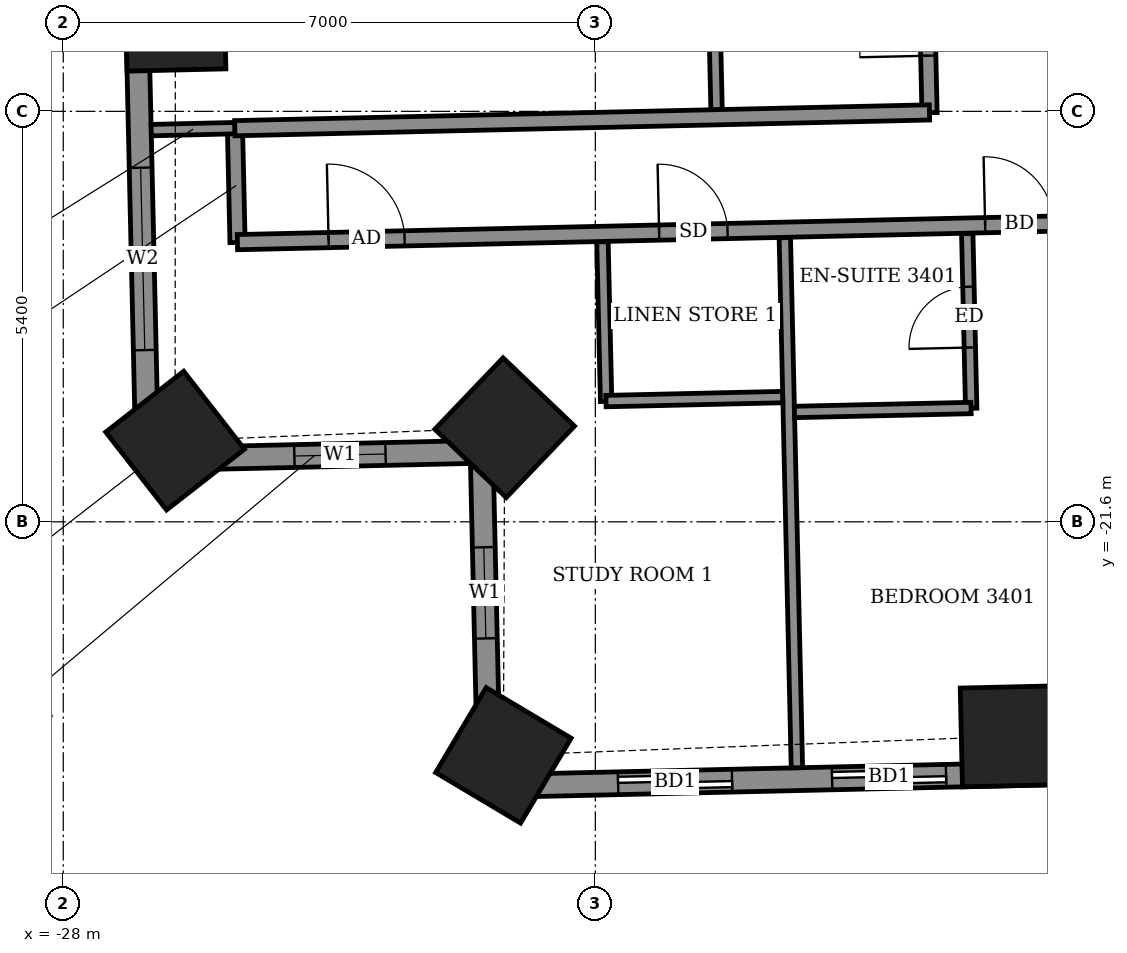
"""IFC4 building model, lengths in metres.
Left out: names, types, materials, properties, quantities, classifications, styles, units other than length and angle.
Written with IfcOpenShell. Run it as: python <this file> out.ifc"""

import sys

from ifc_helpers import new_model, si_unit, direction, frame, frame_2d, origin, origin_2d, place, context, subcontext, project, spatial, rectangle, extrude, element, fill, save


model = new_model("IFC4")
c1 = context("Model", 3, precision=1e-05, world=origin(), true_north=direction((0.0, 1.0)))
c2 = subcontext(c1, "Body", "Model", "MODEL_VIEW")
j1 = project(units=[si_unit("LENGTHUNIT", "METRE"), si_unit("PLANEANGLEUNIT", "RADIAN")], contexts=[c1])
p1 = place(None, origin())
s1 = spatial("IfcSite", under=j1, at=p1, CompositionType="ELEMENT")
p2 = place(p1, origin())
s2 = spatial("IfcBuilding", under=s1, at=p2, CompositionType="ELEMENT")
p3 = place(p2, frame((0.0, 0.0, 137.3)))
s3 = spatial("IfcBuildingStorey", under=s2, at=p3, CompositionType="ELEMENT", Elevation=137.3)
for number, where, z_axis, x_axis in (
    (1, (-26.525, -15.006, -0.55), (0.0, 0.0, 1.0), (0.023, -1.0, 0.0)),
    (2, (-26.529, -20.532, -0.55), (0.0, 0.0, 1.0), (0.615, -0.788, 0.0)),
    (3, (-22.193, -20.362, -0.55), (0.0, 0.0, 1.0), (0.723, -0.691, 0.0)),
    (4, (-22.209, -24.672, -0.55), (0.0, 0.0, 1.0), (0.859, -0.512, 0.0)),
    (5, (-15.535, -24.422, -0.55), (0.0, 0.0, 1.0), (1.0, 0.023, 0.0)),
):
    element("IfcColumn", number, at=place(p3, frame(where, z_axis=z_axis, x_axis=x_axis)), inside=s3, PredefinedType="COLUMN", context=c2, shape_type="SweptSolid", body=[
        extrude(rectangle(XDim=1.3, YDim=1.3, at=origin_2d()), origin(), (0.0, 0.0, 1.0), 3.6),
    ])
p4 = place(p3, frame((-27.161, -9.052, 0.0), z_axis=(0.0, 0.0, 1.0), x_axis=(0.022665616813, -0.999743101909, 0.0)))
e6 = element("IfcWall", 6, at=p4, inside=s3, PredefinedType="SOLIDWALL", context=c2, shape_type="SweptSolid", body=[
    extrude(rectangle(XDim=11.73, YDim=0.3, at=frame_2d((5.865, 0.0))), origin(), (0.0, 0.0, 1.0), 3.05),
])
p5 = place(p4, frame((1.029, 0.0, 0.0)))
e7 = element("IfcOpeningElement", 7, at=p5, cuts=e6, PredefinedType="OPENING", context=c2, shape_type="SweptSolid", body=[
    extrude(rectangle(XDim=1.5, YDim=2.4, at=frame_2d((0.75, 1.2))), frame((0.0, 0.16, 0.0), z_axis=(0.0, -1.0, 0.0), x_axis=(1.0, 0.0, 0.0)), (0.0, 0.0, 1.0), 0.32),
])
p6 = place(p4, frame((3.71, 0.0, 0.9)))
e8 = element("IfcOpeningElement", 8, at=p6, cuts=e6, PredefinedType="OPENING", context=c2, shape_type="SweptSolid", body=[
    extrude(rectangle(XDim=1.2, YDim=1.5, at=frame_2d((0.6, 0.75))), frame((0.0, 0.16, 0.0), z_axis=(0.0, -1.0, 0.0), x_axis=(1.0, 0.0, 0.0)), (0.0, 0.0, 1.0), 0.32),
])
p7 = place(p4, frame((7.892, 0.0, 0.9)))
e9 = element("IfcOpeningElement", 9, at=p7, cuts=e6, PredefinedType="OPENING", context=c2, shape_type="SweptSolid", body=[
    extrude(rectangle(XDim=2.4, YDim=1.5, at=frame_2d((1.2, 0.75))), frame((0.0, 0.16, 0.0), z_axis=(0.0, -1.0, 0.0), x_axis=(1.0, 0.0, 0.0)), (0.0, 0.0, 1.0), 0.32),
])
p8 = place(p3, frame((-26.895, -20.779, 0.0), z_axis=(0.0, 0.0, 1.0), x_axis=(0.999741204967, 0.022749133868, 0.0)))
e10 = element("IfcWall", 10, at=p8, inside=s3, PredefinedType="SOLIDWALL", context=c2, shape_type="SweptSolid", body=[
    extrude(rectangle(XDim=4.4, YDim=0.3, at=frame_2d((2.2, 0.0))), origin(), (0.0, 0.0, 1.0), 2.55),
])
p9 = place(p8, frame((1.936, 0.0, 0.9)))
e11 = element("IfcOpeningElement", 11, at=p9, cuts=e10, PredefinedType="OPENING", context=c2, shape_type="SweptSolid", body=[
    extrude(rectangle(XDim=1.2, YDim=1.5, at=frame_2d((0.6, 0.75))), frame((0.0, 0.16, 0.0), z_axis=(0.0, -1.0, 0.0), x_axis=(1.0, 0.0, 0.0)), (0.0, 0.0, 1.0), 0.32),
])
p10 = place(p3, frame((-22.496, -20.679, 0.0), z_axis=(0.0, 0.0, 1.0), x_axis=(0.022749133868, -0.999741204967, 0.0)))
e12 = element("IfcWall", 12, at=p10, inside=s3, PredefinedType="SOLIDWALL", context=c2, shape_type="SweptSolid", body=[
    extrude(rectangle(XDim=4.4, YDim=0.3, at=frame_2d((2.2, 0.0))), origin(), (0.0, 0.0, 1.0), 2.55),
])
p11 = place(p10, frame((1.256, 0.0, 0.9)))
e13 = element("IfcOpeningElement", 13, at=p11, cuts=e12, PredefinedType="OPENING", context=c2, shape_type="SweptSolid", body=[
    extrude(rectangle(XDim=1.2, YDim=1.5, at=frame_2d((0.6, 0.75))), frame((0.0, 0.16, 0.0), z_axis=(0.0, -1.0, 0.0), x_axis=(1.0, 0.0, 0.0)), (0.0, 0.0, 1.0), 0.32),
])
p12 = place(p3, frame((-22.396, -25.078, 0.0), z_axis=(0.0, 0.0, 1.0), x_axis=(0.99974279854, 0.022678993965, 0.0)))
e14 = element("IfcWall", 14, at=p12, inside=s3, PredefinedType="SOLIDWALL", context=c2, shape_type="SweptSolid", body=[
    extrude(rectangle(XDim=41.844, YDim=0.3, at=frame_2d((20.922, 0.0))), origin(), (0.0, 0.0, 1.0), 3.05),
])
p13 = place(p12, frame((1.696, 0.0, 0.0)))
e15 = element("IfcOpeningElement", 15, at=p13, cuts=e14, PredefinedType="OPENING", context=c2, shape_type="SweptSolid", body=[
    extrude(rectangle(XDim=1.5, YDim=2.4, at=frame_2d((0.75, 1.2))), frame((0.0, 0.16, 0.0), z_axis=(0.0, -1.0, 0.0), x_axis=(1.0, 0.0, 0.0)), (0.0, 0.0, 1.0), 0.32),
])
p14 = place(p12, frame((4.512, 0.0, 0.0)))
e16 = element("IfcOpeningElement", 16, at=p14, cuts=e14, PredefinedType="OPENING", context=c2, shape_type="SweptSolid", body=[
    extrude(rectangle(XDim=1.5, YDim=2.4, at=frame_2d((0.75, 1.2))), frame((0.0, 0.16, 0.0), z_axis=(0.0, -1.0, 0.0), x_axis=(1.0, 0.0, 0.0)), (0.0, 0.0, 1.0), 0.32),
])
p15 = place(p12, frame((9.625, 0.0, 0.0)))
e17 = element("IfcOpeningElement", 17, at=p15, cuts=e14, PredefinedType="OPENING", context=c2, shape_type="SweptSolid", body=[
    extrude(rectangle(XDim=1.5, YDim=2.4, at=frame_2d((0.75, 1.2))), frame((0.0, 0.16, 0.0), z_axis=(0.0, -1.0, 0.0), x_axis=(1.0, 0.0, 0.0)), (0.0, 0.0, 1.0), 0.32),
])
p16 = place(p12, frame((14.749, 0.0, 0.0)))
e18 = element("IfcOpeningElement", 18, at=p16, cuts=e14, PredefinedType="OPENING", context=c2, shape_type="SweptSolid", body=[
    extrude(rectangle(XDim=1.5, YDim=2.4, at=frame_2d((0.75, 1.2))), frame((0.0, 0.16, 0.0), z_axis=(0.0, -1.0, 0.0), x_axis=(1.0, 0.0, 0.0)), (0.0, 0.0, 1.0), 0.32),
])
p17 = place(p12, frame((17.861, 0.0, 0.0)))
e19 = element("IfcOpeningElement", 19, at=p17, cuts=e14, PredefinedType="OPENING", context=c2, shape_type="SweptSolid", body=[
    extrude(rectangle(XDim=1.5, YDim=2.4, at=frame_2d((0.75, 1.2))), frame((0.0, 0.16, 0.0), z_axis=(0.0, -1.0, 0.0), x_axis=(1.0, 0.0, 0.0)), (0.0, 0.0, 1.0), 0.32),
])
p18 = place(p12, frame((22.486, 0.0, 0.0)))
e20 = element("IfcOpeningElement", 20, at=p18, cuts=e14, PredefinedType="OPENING", context=c2, shape_type="SweptSolid", body=[
    extrude(rectangle(XDim=1.5, YDim=2.4, at=frame_2d((0.75, 1.2))), frame((0.0, 0.16, 0.0), z_axis=(0.0, -1.0, 0.0), x_axis=(1.0, 0.0, 0.0)), (0.0, 0.0, 1.0), 0.32),
])
p19 = place(p12, frame((25.598, 0.0, 0.0)))
e21 = element("IfcOpeningElement", 21, at=p19, cuts=e14, PredefinedType="OPENING", context=c2, shape_type="SweptSolid", body=[
    extrude(rectangle(XDim=1.5, YDim=2.4, at=frame_2d((0.75, 1.2))), frame((0.0, 0.16, 0.0), z_axis=(0.0, -1.0, 0.0), x_axis=(1.0, 0.0, 0.0)), (0.0, 0.0, 1.0), 0.32),
])
p20 = place(p12, frame((30.7, 0.0, 0.0)))
e22 = element("IfcOpeningElement", 22, at=p20, cuts=e14, PredefinedType="OPENING", context=c2, shape_type="SweptSolid", body=[
    extrude(rectangle(XDim=1.5, YDim=2.4, at=frame_2d((0.75, 1.2))), frame((0.0, 0.16, 0.0), z_axis=(0.0, -1.0, 0.0), x_axis=(1.0, 0.0, 0.0)), (0.0, 0.0, 1.0), 0.32),
])
p21 = place(p12, frame((35.81, 0.0, 0.0)))
e23 = element("IfcOpeningElement", 23, at=p21, cuts=e14, PredefinedType="OPENING", context=c2, shape_type="SweptSolid", body=[
    extrude(rectangle(XDim=1.5, YDim=2.4, at=frame_2d((0.75, 1.2))), frame((0.0, 0.16, 0.0), z_axis=(0.0, -1.0, 0.0), x_axis=(1.0, 0.0, 0.0)), (0.0, 0.0, 1.0), 0.32),
])
p22 = place(p12, frame((38.124, 0.0, 0.9)))
e24 = element("IfcOpeningElement", 24, at=p22, cuts=e14, PredefinedType="OPENING", context=c2, shape_type="SweptSolid", body=[
    extrude(rectangle(XDim=2.4, YDim=1.5, at=frame_2d((1.2, 0.75))), frame((0.0, 0.16, 0.0), z_axis=(0.0, -1.0, 0.0), x_axis=(1.0, 0.0, 0.0)), (0.0, 0.0, 1.0), 0.32),
])
p23 = place(p3, frame((-18.348, -24.836, 0.0), z_axis=(0.0, 0.0, 1.0), x_axis=(-0.02281919218, 0.999739608332, 0.0)))
e25 = element("IfcWall", 25, at=p23, inside=s3, PredefinedType="PARTITIONING", context=c2, shape_type="SweptSolid", body=[
    extrude(rectangle(XDim=6.976, YDim=0.15, at=frame_2d((3.488, 0.0))), origin(), (0.0, 0.0, 1.0), 2.55),
])
p24 = place(p3, frame((-16.055, -20.107, 0.0), z_axis=(0.0, 0.0, 1.0), x_axis=(-0.022603288534, 0.999744513037, 0.0)))
e26 = element("IfcWall", 26, at=p24, inside=s3, PredefinedType="PARTITIONING", context=c2, shape_type="SweptSolid", body=[
    extrude(rectangle(XDim=2.301, YDim=0.15, at=frame_2d((1.15, 0.0))), origin(), (0.0, 0.0, 1.0), 3.05),
])
p25 = place(p24, frame((0.8, 0.0, 0.0)))
e27 = element("IfcOpeningElement", 27, at=p25, cuts=e26, PredefinedType="OPENING", context=c2, shape_type="SweptSolid", body=[
    extrude(rectangle(XDim=0.8, YDim=2.1, at=frame_2d((0.4, 1.05))), frame((0.0, 0.085, 0.0), z_axis=(0.0, -1.0, 0.0), x_axis=(1.0, 0.0, 0.0)), (0.0, 0.0, 1.0), 0.17),
])
p26 = place(p3, frame((-18.381, -20.155, 0.0), z_axis=(0.0, 0.0, 1.0), x_axis=(0.999749797124, 0.022368351553, 0.0)))
e28 = element("IfcWall", 28, at=p26, inside=s3, PredefinedType="PARTITIONING", context=c2, shape_type="SweptSolid", body=[
    extrude(rectangle(XDim=2.325, YDim=0.15, at=frame_2d((1.162, 0.0))), origin(), (0.0, 0.0, 1.0), 3.05),
])
p27 = place(p3, frame((-20.858, -20.016, 0.0), z_axis=(0.0, 0.0, 1.0), x_axis=(-0.022895647347, 0.999737860308, 0.0)))
e29 = element("IfcWall", 29, at=p27, inside=s3, PredefinedType="PARTITIONING", context=c2, shape_type="SweptSolid", body=[
    extrude(rectangle(XDim=2.101, YDim=0.15, at=frame_2d((1.05, 0.0))), origin(), (0.0, 0.0, 1.0), 3.05),
])
p28 = place(p3, frame((-20.86, -20.012, 0.0), z_axis=(0.0, 0.0, 1.0), x_axis=(0.99974031529, 0.022788198363, 0.0)))
e30 = element("IfcWall", 30, at=p28, inside=s3, PredefinedType="PARTITIONING", context=c2, shape_type="SweptSolid", body=[
    extrude(rectangle(XDim=2.325, YDim=0.15, at=frame_2d((1.162, 0.0))), origin(), (0.0, 0.0, 1.0), 3.05),
])
p29 = place(p3, frame((-25.707, -17.925, 0.0), z_axis=(0.0, 0.0, 1.0), x_axis=(-0.022617910375, 0.999744182344, 0.0)))
e31 = element("IfcWall", 31, at=p29, inside=s3, PredefinedType="PARTITIONING", context=c2, shape_type="SweptSolid", body=[
    extrude(rectangle(XDim=1.5, YDim=0.2, at=frame_2d((0.75, 0.0))), origin(), (0.0, 0.0, 1.0), 3.05),
])
p30 = place(p3, frame((-25.709, -17.921, 0.0), z_axis=(0.0, 0.0, 1.0), x_axis=(0.999742764922, 0.022680475901, 0.0)))
e32 = element("IfcWall", 32, at=p30, inside=s3, PredefinedType="PARTITIONING", context=c2, shape_type="SweptSolid", body=[
    extrude(rectangle(XDim=10.84, YDim=0.2, at=frame_2d((5.42, 0.0))), origin(), (0.0, 0.0, 1.0), 3.05),
])
p31 = place(p30, frame((1.2, 0.0, 0.0)))
e33 = element("IfcOpeningElement", 33, at=p31, cuts=e32, PredefinedType="OPENING", context=c2, shape_type="SweptSolid", body=[
    extrude(rectangle(XDim=1.0, YDim=2.1, at=frame_2d((0.5, 1.05))), frame((0.0, 0.11, 0.0), z_axis=(0.0, -1.0, 0.0), x_axis=(1.0, 0.0, 0.0)), (0.0, 0.0, 1.0), 0.22),
])
p32 = place(p30, frame((5.55, 0.0, 0.0)))
e34 = element("IfcOpeningElement", 34, at=p32, cuts=e32, PredefinedType="OPENING", context=c2, shape_type="SweptSolid", body=[
    extrude(rectangle(XDim=0.9, YDim=2.1, at=frame_2d((0.45, 1.05))), frame((0.0, 0.11, 0.0), z_axis=(0.0, -1.0, 0.0), x_axis=(1.0, 0.0, 0.0)), (0.0, 0.0, 1.0), 0.22),
])
p33 = place(p30, frame((9.84, 0.0, 0.0)))
e35 = element("IfcOpeningElement", 35, at=p33, cuts=e32, PredefinedType="OPENING", context=c2, shape_type="SweptSolid", body=[
    extrude(rectangle(XDim=0.9, YDim=2.1, at=frame_2d((0.45, 1.05))), frame((0.0, 0.11, 0.0), z_axis=(0.0, -1.0, 0.0), x_axis=(1.0, 0.0, 0.0)), (0.0, 0.0, 1.0), 0.22),
])
p34 = place(p3, frame((-19.405, -16.182, 0.0), z_axis=(0.0, 0.0, 1.0), x_axis=(-0.022605686808, 0.999744458811, 0.0)))
e36 = element("IfcWall", 36, at=p34, inside=s3, PredefinedType="PARTITIONING", context=c2, shape_type="SweptSolid", body=[
    extrude(rectangle(XDim=2.3, YDim=0.15, at=frame_2d((1.15, 0.0))), origin(), (0.0, 0.0, 1.0), 3.05),
])
p35 = place(p3, frame((-16.603, -16.218, 0.0), z_axis=(0.0, 0.0, 1.0), x_axis=(-0.022698146637, 0.999742363881, 0.0)))
e37 = element("IfcWall", 37, at=p35, inside=s3, PredefinedType="PARTITIONING", context=c2, shape_type="SweptSolid", body=[
    extrude(rectangle(XDim=28.374, YDim=0.2, at=frame_2d((14.187, 0.0))), origin(), (0.0, 0.0, 1.0), 3.05),
])
p36 = place(p35, frame((24.537, 0.0, 0.0)))
e38 = element("IfcOpeningElement", 38, at=p36, cuts=e37, PredefinedType="OPENING", context=c2, shape_type="SweptSolid", body=[
    extrude(rectangle(XDim=1.0, YDim=2.1, at=frame_2d((0.5, 1.05))), frame((0.0, 0.11, 0.0), z_axis=(0.0, -1.0, 0.0), x_axis=(1.0, 0.0, 0.0)), (0.0, 0.0, 1.0), 0.22),
])
p37 = place(p35, frame((26.724, 0.0, 0.0)))
e39 = element("IfcOpeningElement", 39, at=p37, cuts=e37, PredefinedType="OPENING", context=c2, shape_type="SweptSolid", body=[
    extrude(rectangle(XDim=0.9, YDim=2.1, at=frame_2d((0.45, 1.05))), frame((0.0, 0.11, 0.0), z_axis=(0.0, -1.0, 0.0), x_axis=(1.0, 0.0, 0.0)), (0.0, 0.0, 1.0), 0.22),
])
p38 = place(p35, frame((22.099, 0.0, 0.0)))
e40 = element("IfcOpeningElement", 40, at=p38, cuts=e37, PredefinedType="OPENING", context=c2, shape_type="SweptSolid", body=[
    extrude(rectangle(XDim=1.0, YDim=2.1, at=frame_2d((0.5, 1.05))), frame((0.0, 0.11, 0.0), z_axis=(0.0, -1.0, 0.0), x_axis=(1.0, 0.0, 0.0)), (0.0, 0.0, 1.0), 0.22),
])
p39 = place(p35, frame((16.324, 0.0, 0.0)))
e41 = element("IfcOpeningElement", 41, at=p39, cuts=e37, PredefinedType="OPENING", context=c2, shape_type="SweptSolid", body=[
    extrude(rectangle(XDim=1.0, YDim=2.1, at=frame_2d((0.5, 1.05))), frame((0.0, 0.11, 0.0), z_axis=(0.0, -1.0, 0.0), x_axis=(1.0, 0.0, 0.0)), (0.0, 0.0, 1.0), 0.22),
])
p40 = place(p35, frame((19.449, 0.0, 0.0)))
e42 = element("IfcOpeningElement", 42, at=p40, cuts=e37, PredefinedType="OPENING", context=c2, shape_type="SweptSolid", body=[
    extrude(rectangle(XDim=0.9, YDim=2.1, at=frame_2d((0.45, 1.05))), frame((0.0, 0.11, 0.0), z_axis=(0.0, -1.0, 0.0), x_axis=(1.0, 0.0, 0.0)), (0.0, 0.0, 1.0), 0.22),
])
p41 = place(p35, frame((13.574, 0.0, 0.0)))
e43 = element("IfcOpeningElement", 43, at=p41, cuts=e37, PredefinedType="OPENING", context=c2, shape_type="SweptSolid", body=[
    extrude(rectangle(XDim=1.0, YDim=2.1, at=frame_2d((0.5, 1.05))), frame((0.0, 0.11, 0.0), z_axis=(0.0, -1.0, 0.0), x_axis=(1.0, 0.0, 0.0)), (0.0, 0.0, 1.0), 0.22),
])
p42 = place(p35, frame((11.449, 0.0, 0.0)))
e44 = element("IfcOpeningElement", 44, at=p42, cuts=e37, PredefinedType="OPENING", context=c2, shape_type="SweptSolid", body=[
    extrude(rectangle(XDim=0.9, YDim=2.1, at=frame_2d((0.45, 1.05))), frame((0.0, 0.11, 0.0), z_axis=(0.0, -1.0, 0.0), x_axis=(1.0, 0.0, 0.0)), (0.0, 0.0, 1.0), 0.22),
])
p43 = place(p35, frame((8.524, 0.0, 0.0)))
e45 = element("IfcOpeningElement", 45, at=p43, cuts=e37, PredefinedType="OPENING", context=c2, shape_type="SweptSolid", body=[
    extrude(rectangle(XDim=1.0, YDim=2.1, at=frame_2d((0.5, 1.05))), frame((0.0, 0.11, 0.0), z_axis=(0.0, -1.0, 0.0), x_axis=(1.0, 0.0, 0.0)), (0.0, 0.0, 1.0), 0.22),
])
p44 = place(p35, frame((5.325, 0.0, 0.0)))
e46 = element("IfcOpeningElement", 46, at=p44, cuts=e37, PredefinedType="OPENING", context=c2, shape_type="SweptSolid", body=[
    extrude(rectangle(XDim=1.0, YDim=2.1, at=frame_2d((0.5, 1.05))), frame((0.0, 0.11, 0.0), z_axis=(0.0, -1.0, 0.0), x_axis=(1.0, 0.0, 0.0)), (0.0, 0.0, 1.0), 0.22),
])
p45 = place(p35, frame((2.85, 0.0, 0.0)))
e47 = element("IfcOpeningElement", 47, at=p45, cuts=e37, PredefinedType="OPENING", context=c2, shape_type="SweptSolid", body=[
    extrude(rectangle(XDim=1.0, YDim=2.1, at=frame_2d((0.5, 1.05))), frame((0.0, 0.11, 0.0), z_axis=(0.0, -1.0, 0.0), x_axis=(1.0, 0.0, 0.0)), (0.0, 0.0, 1.0), 0.22),
])
p46 = place(p35, frame((0.75, 0.0, 0.0)))
e48 = element("IfcOpeningElement", 48, at=p46, cuts=e37, PredefinedType="OPENING", context=c2, shape_type="SweptSolid", body=[
    extrude(rectangle(XDim=0.9, YDim=2.1, at=frame_2d((0.45, 1.05))), frame((0.0, 0.11, 0.0), z_axis=(0.0, -1.0, 0.0), x_axis=(1.0, 0.0, 0.0)), (0.0, 0.0, 1.0), 0.22),
])
p47 = place(p3, frame((-26.843, -16.447, 0.0), z_axis=(0.0, 0.0, 1.0), x_axis=(0.999720170098, 0.023655475055, 0.0)))
e49 = element("IfcWall", 49, at=p47, inside=s3, PredefinedType="PARTITIONING", context=c2, shape_type="SweptSolid", body=[
    extrude(rectangle(XDim=1.104, YDim=0.15, at=frame_2d((0.552, 0.0))), origin(), (0.0, 0.0, 1.0), 2.55),
])
p48 = place(p3, frame((-25.743, -16.422, 0.0), z_axis=(0.0, 0.0, 1.0), x_axis=(0.999741076645, 0.022754772455, 0.0)))
e50 = element("IfcWall", 50, at=p48, inside=s3, PredefinedType="PARTITIONING", context=c2, shape_type="SweptSolid", body=[
    extrude(rectangle(XDim=9.141, YDim=0.2, at=frame_2d((4.571, 0.0))), origin(), (0.0, 0.0, 1.0), 3.05),
])
p49 = place(p7, origin())
e51 = element("IfcWindow", 51, at=p49, inside=s3, PartitioningType="DOUBLE_PANEL_VERTICAL", PredefinedType="WINDOW", context=c2, shape_type="SweptSolid", body=[
    extrude(rectangle(XDim=2.4, YDim=1.5, at=frame_2d((1.2, 0.75))), frame((0.0, 0.03, 0.0), z_axis=(0.0, -1.0, 0.0), x_axis=(1.0, 0.0, 0.0)), (0.0, 0.0, 1.0), 0.06),
])
fill(e9, e51)
p50 = place(p9, origin())
e52 = element("IfcWindow", 52, at=p50, inside=s3, PartitioningType="SINGLE_PANEL", PredefinedType="WINDOW", context=c2, shape_type="SweptSolid", body=[
    extrude(rectangle(XDim=1.2, YDim=1.5, at=frame_2d((0.6, 0.75))), frame((0.0, 0.03, 0.0), z_axis=(0.0, -1.0, 0.0), x_axis=(1.0, 0.0, 0.0)), (0.0, 0.0, 1.0), 0.06),
])
fill(e11, e52)
p51 = place(p11, origin())
e53 = element("IfcWindow", 53, at=p51, inside=s3, PartitioningType="SINGLE_PANEL", PredefinedType="WINDOW", context=c2, shape_type="SweptSolid", body=[
    extrude(rectangle(XDim=1.2, YDim=1.5, at=frame_2d((0.6, 0.75))), frame((0.0, 0.03, 0.0), z_axis=(0.0, -1.0, 0.0), x_axis=(1.0, 0.0, 0.0)), (0.0, 0.0, 1.0), 0.06),
])
fill(e13, e53)
p52 = place(p13, origin())
e54 = element("IfcDoor", 54, at=p52, inside=s3, OperationType="SLIDING_TO_LEFT", PredefinedType="DOOR", context=c2, shape_type="SweptSolid", body=[
    extrude(rectangle(XDim=1.5, YDim=2.4, at=frame_2d((0.75, 1.2))), frame((0.0, 0.025, 0.0), z_axis=(0.0, -1.0, 0.0), x_axis=(1.0, 0.0, 0.0)), (0.0, 0.0, 1.0), 0.05),
])
fill(e15, e54)
p53 = place(p14, origin())
e55 = element("IfcDoor", 55, at=p53, inside=s3, OperationType="SLIDING_TO_LEFT", PredefinedType="DOOR", context=c2, shape_type="SweptSolid", body=[
    extrude(rectangle(XDim=1.5, YDim=2.4, at=frame_2d((0.75, 1.2))), frame((0.0, 0.025, 0.0), z_axis=(0.0, -1.0, 0.0), x_axis=(1.0, 0.0, 0.0)), (0.0, 0.0, 1.0), 0.05),
])
fill(e16, e55)
p54 = place(p31, origin())
e56 = element("IfcDoor", 56, at=p54, inside=s3, OperationType="SINGLE_SWING_LEFT", PredefinedType="DOOR", context=c2, shape_type="SweptSolid", body=[
    extrude(rectangle(XDim=1.0, YDim=2.1, at=frame_2d((0.5, 1.05))), frame((0.0, 0.025, 0.0), z_axis=(0.0, -1.0, 0.0), x_axis=(1.0, 0.0, 0.0)), (0.0, 0.0, 1.0), 0.05),
])
fill(e33, e56)
p55 = place(p32, origin())
e57 = element("IfcDoor", 57, at=p55, inside=s3, OperationType="SINGLE_SWING_LEFT", PredefinedType="DOOR", context=c2, shape_type="SweptSolid", body=[
    extrude(rectangle(XDim=0.9, YDim=2.1, at=frame_2d((0.45, 1.05))), frame((0.0, 0.025, 0.0), z_axis=(0.0, -1.0, 0.0), x_axis=(1.0, 0.0, 0.0)), (0.0, 0.0, 1.0), 0.05),
])
fill(e34, e57)
p56 = place(p33, origin())
e58 = element("IfcDoor", 58, at=p56, inside=s3, OperationType="SINGLE_SWING_LEFT", PredefinedType="DOOR", context=c2, shape_type="SweptSolid", body=[
    extrude(rectangle(XDim=0.9, YDim=2.1, at=frame_2d((0.45, 1.05))), frame((0.0, 0.025, 0.0), z_axis=(0.0, -1.0, 0.0), x_axis=(1.0, 0.0, 0.0)), (0.0, 0.0, 1.0), 0.05),
])
fill(e35, e58)
p57 = place(p25, origin())
e59 = element("IfcDoor", 59, at=p57, inside=s3, OperationType="SINGLE_SWING_LEFT", PredefinedType="DOOR", context=c2, shape_type="SweptSolid", body=[
    extrude(rectangle(XDim=0.8, YDim=2.1, at=frame_2d((0.4, 1.05))), frame((0.0, 0.025, 0.0), z_axis=(0.0, -1.0, 0.0), x_axis=(1.0, 0.0, 0.0)), (0.0, 0.0, 1.0), 0.05),
])
fill(e27, e59)
p58 = place(p46, origin())
e60 = element("IfcDoor", 60, at=p58, inside=s3, OperationType="SINGLE_SWING_RIGHT", PredefinedType="DOOR", context=c2, shape_type="SweptSolid", body=[
    extrude(rectangle(XDim=0.9, YDim=2.1, at=frame_2d((0.45, 1.05))), frame((0.0, 0.025, 0.0), z_axis=(0.0, -1.0, 0.0), x_axis=(1.0, 0.0, 0.0)), (0.0, 0.0, 1.0), 0.05),
])
fill(e48, e60)
save(model, sys.argv[1])
